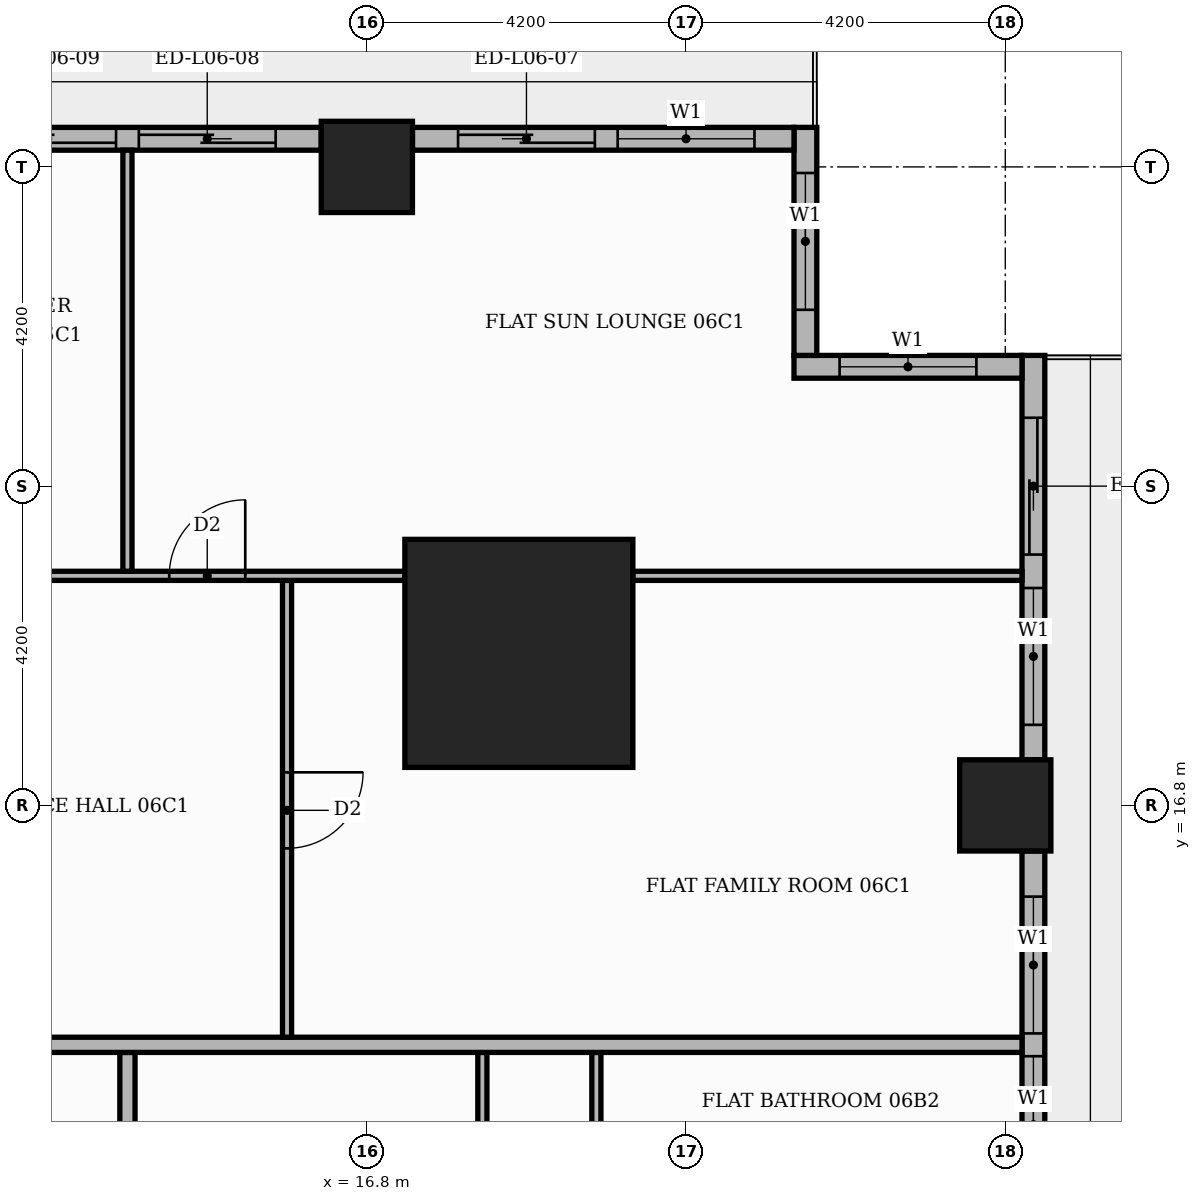
"""IFC4 building model, lengths in metres.
Left out: names, types, materials, properties, quantities, classifications, styles, units other than length and angle.
Written with IfcOpenShell. Run it as: python <this file> out.ifc"""

import sys

from ifc_helpers import new_model, si_unit, direction, frame, frame_2d, origin, origin_2d, place, context, subcontext, project, spatial, rectangle, extrude, element, fill, save


model = new_model("IFC4")
c1 = context("Model", 3, precision=1e-05, world=origin(), true_north=direction((0.0, 1.0)))
c2 = subcontext(c1, "Body", "Model", "MODEL_VIEW")
j1 = project(units=[si_unit("LENGTHUNIT", "METRE"), si_unit("PLANEANGLEUNIT", "RADIAN")], contexts=[c1])
p1 = place(None, origin())
s1 = spatial("IfcSite", under=j1, at=p1, CompositionType="ELEMENT")
p2 = place(p1, origin())
s2 = spatial("IfcBuilding", under=s1, at=p2, CompositionType="ELEMENT")
p3 = place(p2, frame((0.0, 0.0, 30.9)))
s3 = spatial("IfcBuildingStorey", under=s2, at=p3, CompositionType="ELEMENT", Elevation=30.9)
p4 = place(p3, frame((18.8, 18.8, 0.0), z_axis=(0.0, 0.0, 1.0), x_axis=(1.0, 0.0, 0.0)))
e1 = element("IfcColumn", 1, at=p4, inside=s3, PredefinedType="COLUMN", context=c2, shape_type="SweptSolid", body=[
    extrude(rectangle(XDim=3.0, YDim=3.0, at=origin_2d()), origin(), (0.0, 0.0, 1.0), 3.9),
])
for number, where, z_axis, x_axis in (
    (2, (25.2, 16.8, 0.0), (0.0, 0.0, 1.0), (1.0, 0.0, 0.0)),
    (3, (16.8, 25.2, 0.0), (0.0, 0.0, 1.0), (1.0, 0.0, 0.0)),
):
    element("IfcColumn", number, at=place(p3, frame(where, z_axis=z_axis, x_axis=x_axis)), inside=s3, PredefinedType="COLUMN", context=c2, shape_type="SweptSolid", body=[
        extrude(rectangle(XDim=1.2, YDim=1.2, at=origin_2d()), origin(), (0.0, 0.0, 1.0), 3.9),
    ])
p5 = place(p3, frame((25.57, 9.0, 0.0), z_axis=(0.0, 0.0, 1.0), x_axis=(0.0, 1.0, 0.0)))
e4 = element("IfcWall", 4, at=p5, inside=s3, PredefinedType="STANDARD", context=c2, shape_type="SweptSolid", body=[
    extrude(rectangle(XDim=7.2, YDim=0.3, at=frame_2d((3.6, 0.0))), origin(), (0.0, 0.0, 1.0), 3.48),
])
p6 = place(p5, frame((0.6, 0.0, 0.9)))
e5 = element("IfcOpeningElement", 5, at=p6, cuts=e4, PredefinedType="OPENING", context=c2, shape_type="SweptSolid", body=[
    extrude(rectangle(XDim=1.8, YDim=2.1, at=frame_2d((0.9, 1.05))), frame((0.0, 0.16, 0.0), z_axis=(0.0, -1.0, 0.0), x_axis=(1.0, 0.0, 0.0)), (0.0, 0.0, 1.0), 0.32),
])
p7 = place(p5, frame((2.7, 0.0, 0.9)))
e6 = element("IfcOpeningElement", 6, at=p7, cuts=e4, PredefinedType="OPENING", context=c2, shape_type="SweptSolid", body=[
    extrude(rectangle(XDim=1.8, YDim=2.1, at=frame_2d((0.9, 1.05))), frame((0.0, 0.16, 0.0), z_axis=(0.0, -1.0, 0.0), x_axis=(1.0, 0.0, 0.0)), (0.0, 0.0, 1.0), 0.32),
])
p8 = place(p5, frame((4.8, 0.0, 0.9)))
e7 = element("IfcOpeningElement", 7, at=p8, cuts=e4, PredefinedType="OPENING", context=c2, shape_type="SweptSolid", body=[
    extrude(rectangle(XDim=1.8, YDim=2.1, at=frame_2d((0.9, 1.05))), frame((0.0, 0.16, 0.0), z_axis=(0.0, -1.0, 0.0), x_axis=(1.0, 0.0, 0.0)), (0.0, 0.0, 1.0), 0.32),
])
p9 = place(p3, frame((25.57, 17.4, 0.0), z_axis=(0.0, 0.0, 1.0), x_axis=(0.0, 1.0, 0.0)))
e8 = element("IfcWall", 8, at=p9, inside=s3, PredefinedType="STANDARD", context=c2, shape_type="SweptSolid", body=[
    extrude(rectangle(XDim=5.32, YDim=0.3, at=frame_2d((2.66, 0.0))), origin(), (0.0, 0.0, 1.0), 3.48),
])
p10 = place(p9, frame((2.7, 0.0, 0.0)))
e9 = element("IfcOpeningElement", 9, at=p10, cuts=e8, PredefinedType="OPENING", context=c2, shape_type="SweptSolid", body=[
    extrude(rectangle(XDim=1.8, YDim=2.4, at=frame_2d((0.9, 1.2))), frame((0.0, 0.16, 0.0), z_axis=(0.0, -1.0, 0.0), x_axis=(1.0, 0.0, 0.0)), (0.0, 0.0, 1.0), 0.32),
])
p11 = place(p9, frame((0.46, 0.0, 0.9)))
e10 = element("IfcOpeningElement", 10, at=p11, cuts=e8, PredefinedType="OPENING", context=c2, shape_type="SweptSolid", body=[
    extrude(rectangle(XDim=1.8, YDim=2.1, at=frame_2d((0.9, 1.05))), frame((0.0, 0.16, 0.0), z_axis=(0.0, -1.0, 0.0), x_axis=(1.0, 0.0, 0.0)), (0.0, 0.0, 1.0), 0.32),
])
p12 = place(p3, frame((25.42, 22.57, 0.0), z_axis=(0.0, 0.0, 1.0), x_axis=(-1.0, 0.0, 0.0)))
e11 = element("IfcWall", 11, at=p12, inside=s3, PredefinedType="STANDARD", context=c2, shape_type="SweptSolid", body=[
    extrude(rectangle(XDim=3.0, YDim=0.3, at=frame_2d((1.5, 0.0))), origin(), (0.0, 0.0, 1.0), 3.48),
])
p13 = place(p12, frame((0.6, 0.0, 0.9)))
e12 = element("IfcOpeningElement", 12, at=p13, cuts=e11, PredefinedType="OPENING", context=c2, shape_type="SweptSolid", body=[
    extrude(rectangle(XDim=1.8, YDim=2.1, at=frame_2d((0.9, 1.05))), frame((0.0, 0.16, 0.0), z_axis=(0.0, -1.0, 0.0), x_axis=(1.0, 0.0, 0.0)), (0.0, 0.0, 1.0), 0.32),
])
p14 = place(p3, frame((22.57, 22.72, 0.0), z_axis=(0.0, 0.0, 1.0), x_axis=(0.0, 1.0, 0.0)))
e13 = element("IfcWall", 13, at=p14, inside=s3, PredefinedType="STANDARD", context=c2, shape_type="SweptSolid", body=[
    extrude(rectangle(XDim=3.0, YDim=0.3, at=frame_2d((1.5, 0.0))), origin(), (0.0, 0.0, 1.0), 3.48),
])
p15 = place(p14, frame((0.6, 0.0, 0.9)))
e14 = element("IfcOpeningElement", 14, at=p15, cuts=e13, PredefinedType="OPENING", context=c2, shape_type="SweptSolid", body=[
    extrude(rectangle(XDim=1.8, YDim=2.1, at=frame_2d((0.9, 1.05))), frame((0.0, 0.16, 0.0), z_axis=(0.0, -1.0, 0.0), x_axis=(1.0, 0.0, 0.0)), (0.0, 0.0, 1.0), 0.32),
])
p16 = place(p3, frame((22.42, 25.57, 0.0), z_axis=(0.0, 0.0, 1.0), x_axis=(-1.0, 0.0, 0.0)))
e15 = element("IfcWall", 15, at=p16, inside=s3, PredefinedType="STANDARD", context=c2, shape_type="SweptSolid", body=[
    extrude(rectangle(XDim=5.02, YDim=0.3, at=frame_2d((2.51, 0.0))), origin(), (0.0, 0.0, 1.0), 3.48),
])
p17 = place(p16, frame((0.52, 0.0, 0.9)))
e16 = element("IfcOpeningElement", 16, at=p17, cuts=e15, PredefinedType="OPENING", context=c2, shape_type="SweptSolid", body=[
    extrude(rectangle(XDim=1.8, YDim=2.1, at=frame_2d((0.9, 1.05))), frame((0.0, 0.16, 0.0), z_axis=(0.0, -1.0, 0.0), x_axis=(1.0, 0.0, 0.0)), (0.0, 0.0, 1.0), 0.32),
])
p18 = place(p16, frame((2.62, 0.0, 0.0)))
e17 = element("IfcOpeningElement", 17, at=p18, cuts=e15, PredefinedType="OPENING", context=c2, shape_type="SweptSolid", body=[
    extrude(rectangle(XDim=1.8, YDim=2.4, at=frame_2d((0.9, 1.2))), frame((0.0, 0.16, 0.0), z_axis=(0.0, -1.0, 0.0), x_axis=(1.0, 0.0, 0.0)), (0.0, 0.0, 1.0), 0.32),
])
p19 = place(p3, frame((16.2, 25.57, 0.0), z_axis=(0.0, 0.0, 1.0), x_axis=(-1.0, 0.0, 0.0)))
e18 = element("IfcWall", 18, at=p19, inside=s3, PredefinedType="STANDARD", context=c2, shape_type="SweptSolid", body=[
    extrude(rectangle(XDim=7.2, YDim=0.3, at=frame_2d((3.6, 0.0))), origin(), (0.0, 0.0, 1.0), 3.48),
])
p20 = place(p19, frame((0.6, 0.0, 0.0)))
e19 = element("IfcOpeningElement", 19, at=p20, cuts=e18, PredefinedType="OPENING", context=c2, shape_type="SweptSolid", body=[
    extrude(rectangle(XDim=1.8, YDim=2.4, at=frame_2d((0.9, 1.2))), frame((0.0, 0.16, 0.0), z_axis=(0.0, -1.0, 0.0), x_axis=(1.0, 0.0, 0.0)), (0.0, 0.0, 1.0), 0.32),
])
p21 = place(p19, frame((2.7, 0.0, 0.0)))
e20 = element("IfcOpeningElement", 20, at=p21, cuts=e18, PredefinedType="OPENING", context=c2, shape_type="SweptSolid", body=[
    extrude(rectangle(XDim=1.8, YDim=2.4, at=frame_2d((0.9, 1.2))), frame((0.0, 0.16, 0.0), z_axis=(0.0, -1.0, 0.0), x_axis=(1.0, 0.0, 0.0)), (0.0, 0.0, 1.0), 0.32),
])
p22 = place(p19, frame((4.8, 0.0, 0.9)))
e21 = element("IfcOpeningElement", 21, at=p22, cuts=e18, PredefinedType="OPENING", context=c2, shape_type="SweptSolid", body=[
    extrude(rectangle(XDim=1.8, YDim=2.1, at=frame_2d((0.9, 1.05))), frame((0.0, 0.16, 0.0), z_axis=(0.0, -1.0, 0.0), x_axis=(1.0, 0.0, 0.0)), (0.0, 0.0, 1.0), 0.32),
])
p23 = place(p3, frame((13.65, -5.15, 0.0), z_axis=(0.0, 0.0, 1.0), x_axis=(0.0, 1.0, 0.0)))
e22 = element("IfcWall", 22, at=p23, inside=s3, PredefinedType="PARTITIONING", context=c2, shape_type="SweptSolid", body=[
    extrude(rectangle(XDim=18.7, YDim=0.2, at=frame_2d((9.35, 0.0))), origin(), (0.0, 0.0, 1.0), 3.48),
])
p24 = place(p23, frame((3.55, 0.0, 0.0)))
e23 = element("IfcOpeningElement", 23, at=p24, cuts=e22, PredefinedType="OPENING", context=c2, shape_type="SweptSolid", body=[
    extrude(rectangle(XDim=1.1, YDim=2.4, at=frame_2d((0.55, 1.2))), frame((0.0, 0.11, 0.0), z_axis=(0.0, -1.0, 0.0), x_axis=(1.0, 0.0, 0.0)), (0.0, 0.0, 1.0), 0.22),
])
p25 = place(p3, frame((18.32, 9.81, 0.0), z_axis=(0.0, 0.0, 1.0), x_axis=(0.0, 1.0, 0.0)))
e24 = element("IfcWall", 24, at=p25, inside=s3, PredefinedType="PARTITIONING", context=c2, shape_type="SweptSolid", body=[
    extrude(rectangle(XDim=3.74, YDim=0.12, at=frame_2d((1.87, 0.0))), origin(), (0.0, 0.0, 1.0), 3.48),
])
p26 = place(p25, frame((1.44, 0.0, 0.0)))
e25 = element("IfcOpeningElement", 25, at=p26, cuts=e24, PredefinedType="OPENING", context=c2, shape_type="SweptSolid", body=[
    extrude(rectangle(XDim=0.9, YDim=2.1, at=frame_2d((0.45, 1.05))), frame((0.0, 0.07, 0.0), z_axis=(0.0, -1.0, 0.0), x_axis=(1.0, 0.0, 0.0)), (0.0, 0.0, 1.0), 0.14),
])
p27 = place(p3, frame((19.82, 11.61, 0.0), z_axis=(0.0, 0.0, 1.0), x_axis=(0.0, 1.0, 0.0)))
e26 = element("IfcWall", 26, at=p27, inside=s3, PredefinedType="PARTITIONING", context=c2, shape_type="SweptSolid", body=[
    extrude(rectangle(XDim=1.94, YDim=0.12, at=frame_2d((0.97, 0.0))), origin(), (0.0, 0.0, 1.0), 3.48),
])
p28 = place(p3, frame((-13.65, 13.65, 0.0), z_axis=(0.0, 0.0, 1.0), x_axis=(1.0, 0.0, 0.0)))
e27 = element("IfcWall", 27, at=p28, inside=s3, PredefinedType="PARTITIONING", context=c2, shape_type="SweptSolid", body=[
    extrude(rectangle(XDim=39.07, YDim=0.2, at=frame_2d((19.535, 0.0))), origin(), (0.0, 0.0, 1.0), 3.48),
])
p29 = place(p28, frame((24.65, 0.0, 0.0)))
e28 = element("IfcOpeningElement", 28, at=p29, cuts=e27, PredefinedType="OPENING", context=c2, shape_type="SweptSolid", body=[
    extrude(rectangle(XDim=1.1, YDim=2.4, at=frame_2d((0.55, 1.2))), frame((0.0, 0.11, 0.0), z_axis=(0.0, -1.0, 0.0), x_axis=(1.0, 0.0, 0.0)), (0.0, 0.0, 1.0), 0.22),
])
p30 = place(p28, frame((14.15, 0.0, 0.0)))
e29 = element("IfcOpeningElement", 29, at=p30, cuts=e27, PredefinedType="OPENING", context=c2, shape_type="SweptSolid", body=[
    extrude(rectangle(XDim=1.1, YDim=2.4, at=frame_2d((0.55, 1.2))), frame((0.0, 0.11, 0.0), z_axis=(0.0, -1.0, 0.0), x_axis=(1.0, 0.0, 0.0)), (0.0, 0.0, 1.0), 0.22),
])
p31 = place(p3, frame((15.75, 13.75, 0.0), z_axis=(0.0, 0.0, 1.0), x_axis=(0.0, 1.0, 0.0)))
e30 = element("IfcWall", 30, at=p31, inside=s3, PredefinedType="PARTITIONING", context=c2, shape_type="SweptSolid", body=[
    extrude(rectangle(XDim=6.01, YDim=0.12, at=frame_2d((3.005, 0.0))), origin(), (0.0, 0.0, 1.0), 3.48),
])
p32 = place(p31, frame((2.485, 0.0, 0.0)))
e31 = element("IfcOpeningElement", 31, at=p32, cuts=e30, PredefinedType="OPENING", context=c2, shape_type="SweptSolid", body=[
    extrude(rectangle(XDim=1.0, YDim=2.1, at=frame_2d((0.5, 1.05))), frame((0.0, 0.07, 0.0), z_axis=(0.0, -1.0, 0.0), x_axis=(1.0, 0.0, 0.0)), (0.0, 0.0, 1.0), 0.14),
])
p33 = place(p3, frame((5.35, 19.82, 0.0), z_axis=(0.0, 0.0, 1.0), x_axis=(1.0, 0.0, 0.0)))
e32 = element("IfcWall", 32, at=p33, inside=s3, PredefinedType="PARTITIONING", context=c2, shape_type="SweptSolid", body=[
    extrude(rectangle(XDim=11.95, YDim=0.12, at=frame_2d((5.975, 0.0))), origin(), (0.0, 0.0, 1.0), 3.48),
])
p34 = place(p33, frame((8.85, 0.0, 0.0)))
e33 = element("IfcOpeningElement", 33, at=p34, cuts=e32, PredefinedType="OPENING", context=c2, shape_type="SweptSolid", body=[
    extrude(rectangle(XDim=1.0, YDim=2.1, at=frame_2d((0.5, 1.05))), frame((0.0, 0.07, 0.0), z_axis=(0.0, -1.0, 0.0), x_axis=(1.0, 0.0, 0.0)), (0.0, 0.0, 1.0), 0.14),
])
p35 = place(p33, frame((5.75, 0.0, 0.0)))
e34 = element("IfcOpeningElement", 34, at=p35, cuts=e32, PredefinedType="OPENING", context=c2, shape_type="SweptSolid", body=[
    extrude(rectangle(XDim=0.9, YDim=2.1, at=frame_2d((0.45, 1.05))), frame((0.0, 0.07, 0.0), z_axis=(0.0, -1.0, 0.0), x_axis=(1.0, 0.0, 0.0)), (0.0, 0.0, 1.0), 0.14),
])
p36 = place(p3, frame((20.3, 19.82, 0.0), z_axis=(0.0, 0.0, 1.0), x_axis=(1.0, 0.0, 0.0)))
e35 = element("IfcWall", 35, at=p36, inside=s3, PredefinedType="PARTITIONING", context=c2, shape_type="SweptSolid", body=[
    extrude(rectangle(XDim=5.12, YDim=0.12, at=frame_2d((2.56, 0.0))), origin(), (0.0, 0.0, 1.0), 3.48),
])
p37 = place(p3, frame((13.65, 19.88, 0.0), z_axis=(0.0, 0.0, 1.0), x_axis=(0.0, 1.0, 0.0)))
e36 = element("IfcWall", 36, at=p37, inside=s3, PredefinedType="PARTITIONING", context=c2, shape_type="SweptSolid", body=[
    extrude(rectangle(XDim=5.54, YDim=0.12, at=frame_2d((2.77, 0.0))), origin(), (0.0, 0.0, 1.0), 3.48),
])
p38 = place(p7, origin())
e37 = element("IfcWindow", 37, at=p38, inside=s3, PartitioningType="SINGLE_PANEL", PredefinedType="WINDOW", context=c2, shape_type="SweptSolid", body=[
    extrude(rectangle(XDim=1.8, YDim=2.1, at=frame_2d((0.9, 1.05))), frame((0.0, 0.03, 0.0), z_axis=(0.0, -1.0, 0.0), x_axis=(1.0, 0.0, 0.0)), (0.0, 0.0, 1.0), 0.06),
])
fill(e6, e37)
p39 = place(p8, origin())
e38 = element("IfcWindow", 38, at=p39, inside=s3, PartitioningType="SINGLE_PANEL", PredefinedType="WINDOW", context=c2, shape_type="SweptSolid", body=[
    extrude(rectangle(XDim=1.8, YDim=2.1, at=frame_2d((0.9, 1.05))), frame((0.0, 0.03, 0.0), z_axis=(0.0, -1.0, 0.0), x_axis=(1.0, 0.0, 0.0)), (0.0, 0.0, 1.0), 0.06),
])
fill(e7, e38)
p40 = place(p10, origin())
e39 = element("IfcDoor", 39, at=p40, inside=s3, OperationType="SLIDING_TO_LEFT", PredefinedType="DOOR", context=c2, shape_type="SweptSolid", body=[
    extrude(rectangle(XDim=1.8, YDim=2.4, at=frame_2d((0.9, 1.2))), frame((0.0, 0.025, 0.0), z_axis=(0.0, -1.0, 0.0), x_axis=(1.0, 0.0, 0.0)), (0.0, 0.0, 1.0), 0.05),
])
fill(e9, e39)
p41 = place(p11, origin())
e40 = element("IfcWindow", 40, at=p41, inside=s3, PartitioningType="SINGLE_PANEL", PredefinedType="WINDOW", context=c2, shape_type="SweptSolid", body=[
    extrude(rectangle(XDim=1.8, YDim=2.1, at=frame_2d((0.9, 1.05))), frame((0.0, 0.03, 0.0), z_axis=(0.0, -1.0, 0.0), x_axis=(1.0, 0.0, 0.0)), (0.0, 0.0, 1.0), 0.06),
])
fill(e10, e40)
p42 = place(p13, origin())
e41 = element("IfcWindow", 41, at=p42, inside=s3, PartitioningType="SINGLE_PANEL", PredefinedType="WINDOW", context=c2, shape_type="SweptSolid", body=[
    extrude(rectangle(XDim=1.8, YDim=2.1, at=frame_2d((0.9, 1.05))), frame((0.0, 0.03, 0.0), z_axis=(0.0, -1.0, 0.0), x_axis=(1.0, 0.0, 0.0)), (0.0, 0.0, 1.0), 0.06),
])
fill(e12, e41)
p43 = place(p15, origin())
e42 = element("IfcWindow", 42, at=p43, inside=s3, PartitioningType="SINGLE_PANEL", PredefinedType="WINDOW", context=c2, shape_type="SweptSolid", body=[
    extrude(rectangle(XDim=1.8, YDim=2.1, at=frame_2d((0.9, 1.05))), frame((0.0, 0.03, 0.0), z_axis=(0.0, -1.0, 0.0), x_axis=(1.0, 0.0, 0.0)), (0.0, 0.0, 1.0), 0.06),
])
fill(e14, e42)
p44 = place(p17, origin())
e43 = element("IfcWindow", 43, at=p44, inside=s3, PartitioningType="SINGLE_PANEL", PredefinedType="WINDOW", context=c2, shape_type="SweptSolid", body=[
    extrude(rectangle(XDim=1.8, YDim=2.1, at=frame_2d((0.9, 1.05))), frame((0.0, 0.03, 0.0), z_axis=(0.0, -1.0, 0.0), x_axis=(1.0, 0.0, 0.0)), (0.0, 0.0, 1.0), 0.06),
])
fill(e16, e43)
p45 = place(p18, origin())
e44 = element("IfcDoor", 44, at=p45, inside=s3, OperationType="SLIDING_TO_RIGHT", PredefinedType="DOOR", context=c2, shape_type="SweptSolid", body=[
    extrude(rectangle(XDim=1.8, YDim=2.4, at=frame_2d((0.9, 1.2))), frame((0.0, 0.025, 0.0), z_axis=(0.0, -1.0, 0.0), x_axis=(1.0, 0.0, 0.0)), (0.0, 0.0, 1.0), 0.05),
])
fill(e17, e44)
p46 = place(p20, origin())
e45 = element("IfcDoor", 45, at=p46, inside=s3, OperationType="SLIDING_TO_LEFT", PredefinedType="DOOR", context=c2, shape_type="SweptSolid", body=[
    extrude(rectangle(XDim=1.8, YDim=2.4, at=frame_2d((0.9, 1.2))), frame((0.0, 0.025, 0.0), z_axis=(0.0, -1.0, 0.0), x_axis=(1.0, 0.0, 0.0)), (0.0, 0.0, 1.0), 0.05),
])
fill(e19, e45)
p47 = place(p21, origin())
e46 = element("IfcDoor", 46, at=p47, inside=s3, OperationType="SLIDING_TO_RIGHT", PredefinedType="DOOR", context=c2, shape_type="SweptSolid", body=[
    extrude(rectangle(XDim=1.8, YDim=2.4, at=frame_2d((0.9, 1.2))), frame((0.0, 0.025, 0.0), z_axis=(0.0, -1.0, 0.0), x_axis=(1.0, 0.0, 0.0)), (0.0, 0.0, 1.0), 0.05),
])
fill(e20, e46)
p48 = place(p32, frame((1.0, 0.0, 0.0), z_axis=(0.0, 0.0, 1.0), x_axis=(-1.0, 0.0, 0.0)))
e47 = element("IfcDoor", 47, at=p48, inside=s3, OperationType="SINGLE_SWING_RIGHT", PredefinedType="DOOR", context=c2, shape_type="SweptSolid", body=[
    extrude(rectangle(XDim=1.0, YDim=2.1, at=frame_2d((0.5, 1.05))), frame((0.0, 0.025, 0.0), z_axis=(0.0, -1.0, 0.0), x_axis=(1.0, 0.0, 0.0)), (0.0, 0.0, 1.0), 0.05),
])
fill(e31, e47)
p49 = place(p34, origin())
e48 = element("IfcDoor", 48, at=p49, inside=s3, OperationType="SINGLE_SWING_RIGHT", PredefinedType="DOOR", context=c2, shape_type="SweptSolid", body=[
    extrude(rectangle(XDim=1.0, YDim=2.1, at=frame_2d((0.5, 1.05))), frame((0.0, 0.025, 0.0), z_axis=(0.0, -1.0, 0.0), x_axis=(1.0, 0.0, 0.0)), (0.0, 0.0, 1.0), 0.05),
])
fill(e33, e48)
save(model, sys.argv[1])
